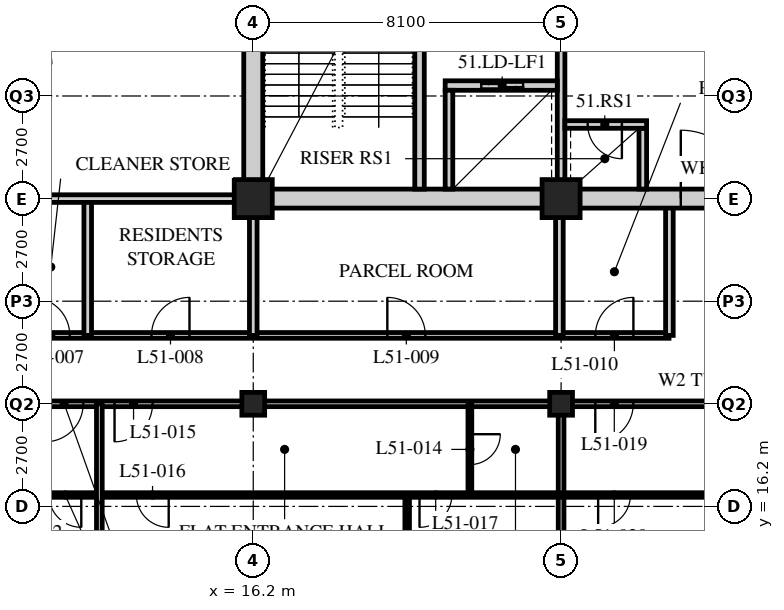
"""IFC4 building model, lengths in metres.
Left out: names, types, materials, properties, quantities, classifications, styles, units other than length and angle.
Written with IfcOpenShell. Run it as: python <this file> out.ifc"""

import sys

from ifc_helpers import new_model, si_unit, direction, frame, frame_2d, origin, origin_2d, place, context, subcontext, project, spatial, rectangle, hollow_rectangle, extrude, element, fill, save


model = new_model("IFC4")
c1 = context("Model", 3, precision=1e-05, world=origin(), true_north=direction((0.0, 1.0)))
c2 = subcontext(c1, "Body", "Model", "MODEL_VIEW")
j1 = project(units=[si_unit("LENGTHUNIT", "METRE"), si_unit("PLANEANGLEUNIT", "RADIAN")], contexts=[c1])
p1 = place(None, origin())
s1 = spatial("IfcSite", under=j1, at=p1, CompositionType="ELEMENT")
p2 = place(p1, origin())
s2 = spatial("IfcBuilding", under=s1, at=p2, CompositionType="ELEMENT")
p3 = place(p2, frame((0.0, 0.0, 199.2)))
s3 = spatial("IfcBuildingStorey", under=s2, at=p3, CompositionType="ELEMENT", Elevation=199.2)
p4 = place(p3, frame((16.2, 18.9, 0.0), z_axis=(0.0, 0.0, 1.0), x_axis=(1.0, 0.0, 0.0)))
e1 = element("IfcColumn", 1, at=p4, inside=s3, PredefinedType="COLUMN", context=c2, shape_type="SweptSolid", body=[
    extrude(hollow_rectangle(XDim=0.6, YDim=0.6, WallThickness=0.05, at=origin_2d()), origin(), (0.0, 0.0, 1.0), 3.6),
])
p5 = place(p3, frame((16.2, 24.3, 0.0), z_axis=(0.0, 0.0, 1.0), x_axis=(1.0, 0.0, 0.0)))
e2 = element("IfcColumn", 2, at=p5, inside=s3, PredefinedType="COLUMN", context=c2, shape_type="SweptSolid", body=[
    extrude(hollow_rectangle(XDim=1.0, YDim=1.0, WallThickness=0.1, at=origin_2d()), origin(), (0.0, 0.0, 1.0), 3.6),
])
p6 = place(p3, frame((24.3, 18.9, 0.0), z_axis=(0.0, 0.0, 1.0), x_axis=(1.0, 0.0, 0.0)))
e3 = element("IfcColumn", 3, at=p6, inside=s3, PredefinedType="COLUMN", context=c2, shape_type="SweptSolid", body=[
    extrude(hollow_rectangle(XDim=0.6, YDim=0.6, WallThickness=0.05, at=origin_2d()), origin(), (0.0, 0.0, 1.0), 3.6),
])
p7 = place(p3, frame((24.3, 24.3, 0.0), z_axis=(0.0, 0.0, 1.0), x_axis=(1.0, 0.0, 0.0)))
e4 = element("IfcColumn", 4, at=p7, inside=s3, PredefinedType="COLUMN", context=c2, shape_type="SweptSolid", body=[
    extrude(hollow_rectangle(XDim=1.0, YDim=1.0, WallThickness=0.1, at=origin_2d()), origin(), (0.0, 0.0, 1.0), 3.6),
])
p8 = place(p3, frame((8.1, 18.9, 0.0), z_axis=(0.0, 0.0, 1.0), x_axis=(1.0, 0.0, 0.0)))
e5 = element("IfcWall", 5, at=p8, inside=s3, PredefinedType="PARTITIONING", context=c2, shape_type="SweptSolid", body=[
    extrude(rectangle(XDim=40.5, YDim=0.15, at=frame_2d((20.25, 0.0))), origin(), (0.0, 0.0, 1.0), 2.778),
])
p9 = place(p8, frame((4.45, 0.0, 0.0)))
e6 = element("IfcOpeningElement", 6, at=p9, cuts=e5, PredefinedType="OPENING", context=c2, shape_type="SweptSolid", body=[
    extrude(rectangle(XDim=1.0, YDim=2.1, at=frame_2d((0.5, 1.05))), frame((0.0, 0.085, 0.0), z_axis=(0.0, -1.0, 0.0), x_axis=(1.0, 0.0, 0.0)), (0.0, 0.0, 1.0), 0.17),
])
p10 = place(p8, frame((17.1, 0.0, 0.0)))
e7 = element("IfcOpeningElement", 7, at=p10, cuts=e5, PredefinedType="OPENING", context=c2, shape_type="SweptSolid", body=[
    extrude(rectangle(XDim=1.0, YDim=2.1, at=frame_2d((0.5, 1.05))), frame((0.0, 0.085, 0.0), z_axis=(0.0, -1.0, 0.0), x_axis=(1.0, 0.0, 0.0)), (0.0, 0.0, 1.0), 0.17),
])
p11 = place(p8, frame((28.75, 0.0, 0.0)))
e8 = element("IfcOpeningElement", 8, at=p11, cuts=e5, PredefinedType="OPENING", context=c2, shape_type="SweptSolid", body=[
    extrude(rectangle(XDim=1.0, YDim=2.1, at=frame_2d((0.5, 1.05))), frame((0.0, 0.085, 0.0), z_axis=(0.0, -1.0, 0.0), x_axis=(1.0, 0.0, 0.0)), (0.0, 0.0, 1.0), 0.17),
])
p12 = place(p8, frame((2.625, 0.0, 0.0)))
e9 = element("IfcOpeningElement", 9, at=p12, cuts=e5, PredefinedType="OPENING", context=c2, shape_type="SweptSolid", body=[
    extrude(rectangle(XDim=1.0, YDim=2.1, at=frame_2d((0.5, 1.05))), frame((0.0, 0.085, 0.0), z_axis=(0.0, -1.0, 0.0), x_axis=(1.0, 0.0, 0.0)), (0.0, 0.0, 1.0), 0.17),
])
p13 = place(p8, frame((36.875, 0.0, 0.0)))
e10 = element("IfcOpeningElement", 10, at=p13, cuts=e5, PredefinedType="OPENING", context=c2, shape_type="SweptSolid", body=[
    extrude(rectangle(XDim=1.0, YDim=2.1, at=frame_2d((0.5, 1.05))), frame((0.0, 0.085, 0.0), z_axis=(0.0, -1.0, 0.0), x_axis=(1.0, 0.0, 0.0)), (0.0, 0.0, 1.0), 0.17),
])
p14 = place(p3, frame((9.9, 20.7, 0.0), z_axis=(0.0, 0.0, 1.0), x_axis=(1.0, 0.0, 0.0)))
e11 = element("IfcWall", 11, at=p14, inside=s3, PredefinedType="PARTITIONING", context=c2, shape_type="SweptSolid", body=[
    extrude(rectangle(XDim=17.24, YDim=0.15, at=frame_2d((8.62, 0.0))), origin(), (0.0, 0.0, 1.0), 3.39),
])
p15 = place(p14, frame((0.472, 0.0, 0.0)))
e12 = element("IfcOpeningElement", 12, at=p15, cuts=e11, PredefinedType="OPENING", context=c2, shape_type="SweptSolid", body=[
    extrude(rectangle(XDim=1.0, YDim=2.1, at=frame_2d((0.5, 1.05))), frame((0.0, 0.085, 0.0), z_axis=(0.0, -1.0, 0.0), x_axis=(1.0, 0.0, 0.0)), (0.0, 0.0, 1.0), 0.17),
])
p16 = place(p14, frame((3.622, 0.0, 0.0)))
e13 = element("IfcOpeningElement", 13, at=p16, cuts=e11, PredefinedType="OPENING", context=c2, shape_type="SweptSolid", body=[
    extrude(rectangle(XDim=1.0, YDim=2.1, at=frame_2d((0.5, 1.05))), frame((0.0, 0.085, 0.0), z_axis=(0.0, -1.0, 0.0), x_axis=(1.0, 0.0, 0.0)), (0.0, 0.0, 1.0), 0.17),
])
p17 = place(p14, frame((9.828, 0.0, 0.0)))
e14 = element("IfcOpeningElement", 14, at=p17, cuts=e11, PredefinedType="OPENING", context=c2, shape_type="SweptSolid", body=[
    extrude(rectangle(XDim=1.0, YDim=2.1, at=frame_2d((0.5, 1.05))), frame((0.0, 0.085, 0.0), z_axis=(0.0, -1.0, 0.0), x_axis=(1.0, 0.0, 0.0)), (0.0, 0.0, 1.0), 0.17),
])
p18 = place(p14, frame((15.303, 0.0, 0.0)))
e15 = element("IfcOpeningElement", 15, at=p18, cuts=e11, PredefinedType="OPENING", context=c2, shape_type="SweptSolid", body=[
    extrude(rectangle(XDim=1.0, YDim=2.1, at=frame_2d((0.5, 1.05))), frame((0.0, 0.085, 0.0), z_axis=(0.0, -1.0, 0.0), x_axis=(1.0, 0.0, 0.0)), (0.0, 0.0, 1.0), 0.17),
])
p19 = place(p3, frame((16.2, 20.7, 0.0), z_axis=(0.0, 0.0, 1.0), x_axis=(0.0, 1.0, 0.0)))
e16 = element("IfcWall", 16, at=p19, inside=s3, PredefinedType="SOLIDWALL", context=c2, shape_type="SweptSolid", body=[
    extrude(rectangle(XDim=3.6, YDim=0.2, at=frame_2d((1.8, 0.0))), origin(), (0.0, 0.0, 1.0), 2.778),
])
p20 = place(p3, frame((11.844, 20.7, 0.0), z_axis=(0.0, 0.0, 1.0), x_axis=(0.0, 1.0, 0.0)))
e17 = element("IfcWall", 17, at=p20, inside=s3, PredefinedType="SOLIDWALL", context=c2, shape_type="SweptSolid", body=[
    extrude(rectangle(XDim=3.6, YDim=0.2, at=frame_2d((1.8, 0.0))), origin(), (0.0, 0.0, 1.0), 3.39),
])
p21 = place(p3, frame((24.256, 20.7, 0.0), z_axis=(0.0, 0.0, 1.0), x_axis=(0.0, 1.0, 0.0)))
e18 = element("IfcWall", 18, at=p21, inside=s3, PredefinedType="SOLIDWALL", context=c2, shape_type="SweptSolid", body=[
    extrude(rectangle(XDim=3.6, YDim=0.2, at=frame_2d((1.8, 0.0))), origin(), (0.0, 0.0, 1.0), 2.778),
])
p22 = place(p3, frame((27.15, 20.7, 0.0), z_axis=(0.0, 0.0, 1.0), x_axis=(0.0, 1.0, 0.0)))
e19 = element("IfcWall", 19, at=p22, inside=s3, PredefinedType="SOLIDWALL", context=c2, shape_type="SweptSolid", body=[
    extrude(rectangle(XDim=3.6, YDim=0.2, at=frame_2d((1.8, 0.0))), origin(), (0.0, 0.0, 1.0), 3.39),
])
p23 = place(p3, frame((9.9, 24.3, 0.0), z_axis=(0.0, 0.0, 1.0), x_axis=(1.0, 0.0, 0.0)))
e20 = element("IfcWall", 20, at=p23, inside=s3, PredefinedType="SOLIDWALL", context=c2, shape_type="SweptSolid", body=[
    extrude(rectangle(XDim=6.3, YDim=0.2, at=frame_2d((3.15, 0.0))), origin(), (0.0, 0.0, 1.0), 3.39),
])
p24 = place(p3, frame((21.9, 18.9, 0.0), z_axis=(0.0, 0.0, 1.0), x_axis=(0.0, -1.0, 0.0)))
e21 = element("IfcWall", 21, at=p24, inside=s3, PredefinedType="PARTITIONING", context=c2, shape_type="SweptSolid", body=[
    extrude(rectangle(XDim=2.4, YDim=0.1, at=frame_2d((1.2, 0.0))), origin(), (0.0, 0.0, 1.0), 3.39),
])
p25 = place(p24, frame((0.8, 0.0, 0.0)))
e22 = element("IfcOpeningElement", 22, at=p25, cuts=e21, PredefinedType="OPENING", context=c2, shape_type="SweptSolid", body=[
    extrude(rectangle(XDim=0.8, YDim=2.1, at=frame_2d((0.4, 1.05))), frame((0.0, 0.06, 0.0), z_axis=(0.0, -1.0, 0.0), x_axis=(1.0, 0.0, 0.0)), (0.0, 0.0, 1.0), 0.12),
])
p26 = place(p3, frame((20.25, 16.5, 0.0), z_axis=(0.0, 0.0, 1.0), x_axis=(0.0, -1.0, 0.0)))
e23 = element("IfcWall", 23, at=p26, inside=s3, PredefinedType="PARTITIONING", context=c2, shape_type="SweptSolid", body=[
    extrude(rectangle(XDim=5.4, YDim=0.12, at=frame_2d((2.7, 0.0))), origin(), (0.0, 0.0, 1.0), 3.39),
])
p27 = place(p3, frame((24.3, 18.9, 0.0), z_axis=(0.0, 0.0, 1.0), x_axis=(0.0, -1.0, 0.0)))
e24 = element("IfcWall", 24, at=p27, inside=s3, PredefinedType="PARTITIONING", context=c2, shape_type="SweptSolid", body=[
    extrude(rectangle(XDim=7.8, YDim=0.15, at=frame_2d((3.9, 0.0))), origin(), (0.0, 0.0, 1.0), 2.778),
])
p28 = place(p3, frame((8.1, 16.5, 0.0), z_axis=(0.0, 0.0, 1.0), x_axis=(1.0, 0.0, 0.0)))
e25 = element("IfcWall", 25, at=p28, inside=s3, PredefinedType="PARTITIONING", context=c2, shape_type="SweptSolid", body=[
    extrude(rectangle(XDim=40.5, YDim=0.12, at=frame_2d((20.25, 0.0))), origin(), (0.0, 0.0, 1.0), 3.39),
])
p29 = place(p28, frame((5.025, 0.0, 0.0)))
e26 = element("IfcOpeningElement", 26, at=p29, cuts=e25, PredefinedType="OPENING", context=c2, shape_type="SweptSolid", body=[
    extrude(rectangle(XDim=0.85, YDim=2.1, at=frame_2d((0.425, 1.05))), frame((0.0, 0.07, 0.0), z_axis=(0.0, -1.0, 0.0), x_axis=(1.0, 0.0, 0.0)), (0.0, 0.0, 1.0), 0.14),
])
p30 = place(p28, frame((12.475, 0.0, 0.0)))
e27 = element("IfcOpeningElement", 27, at=p30, cuts=e25, PredefinedType="OPENING", context=c2, shape_type="SweptSolid", body=[
    extrude(rectangle(XDim=0.85, YDim=2.1, at=frame_2d((0.425, 1.05))), frame((0.0, 0.07, 0.0), z_axis=(0.0, -1.0, 0.0), x_axis=(1.0, 0.0, 0.0)), (0.0, 0.0, 1.0), 0.14),
])
p31 = place(p28, frame((17.175, 0.0, 0.0)))
e28 = element("IfcOpeningElement", 28, at=p31, cuts=e25, PredefinedType="OPENING", context=c2, shape_type="SweptSolid", body=[
    extrude(rectangle(XDim=0.85, YDim=2.1, at=frame_2d((0.425, 1.05))), frame((0.0, 0.07, 0.0), z_axis=(0.0, -1.0, 0.0), x_axis=(1.0, 0.0, 0.0)), (0.0, 0.0, 1.0), 0.14),
])
p32 = place(p28, frame((24.625, 0.0, 0.0)))
e29 = element("IfcOpeningElement", 29, at=p32, cuts=e25, PredefinedType="OPENING", context=c2, shape_type="SweptSolid", body=[
    extrude(rectangle(XDim=0.85, YDim=2.1, at=frame_2d((0.425, 1.05))), frame((0.0, 0.07, 0.0), z_axis=(0.0, -1.0, 0.0), x_axis=(1.0, 0.0, 0.0)), (0.0, 0.0, 1.0), 0.14),
])
p33 = place(p28, frame((29.325, 0.0, 0.0)))
e30 = element("IfcOpeningElement", 30, at=p33, cuts=e25, PredefinedType="OPENING", context=c2, shape_type="SweptSolid", body=[
    extrude(rectangle(XDim=0.85, YDim=2.1, at=frame_2d((0.425, 1.05))), frame((0.0, 0.07, 0.0), z_axis=(0.0, -1.0, 0.0), x_axis=(1.0, 0.0, 0.0)), (0.0, 0.0, 1.0), 0.14),
])
p34 = place(p28, frame((32.725, 0.0, 0.0)))
e31 = element("IfcOpeningElement", 31, at=p34, cuts=e25, PredefinedType="OPENING", context=c2, shape_type="SweptSolid", body=[
    extrude(rectangle(XDim=0.85, YDim=2.1, at=frame_2d((0.425, 1.05))), frame((0.0, 0.07, 0.0), z_axis=(0.0, -1.0, 0.0), x_axis=(1.0, 0.0, 0.0)), (0.0, 0.0, 1.0), 0.14),
])
p35 = place(p28, frame((2.725, 0.0, 0.0)))
e32 = element("IfcOpeningElement", 32, at=p35, cuts=e25, PredefinedType="OPENING", context=c2, shape_type="SweptSolid", body=[
    extrude(rectangle(XDim=0.85, YDim=2.1, at=frame_2d((0.425, 1.05))), frame((0.0, 0.07, 0.0), z_axis=(0.0, -1.0, 0.0), x_axis=(1.0, 0.0, 0.0)), (0.0, 0.0, 1.0), 0.14),
])
p36 = place(p28, frame((36.925, 0.0, 0.0)))
e33 = element("IfcOpeningElement", 33, at=p36, cuts=e25, PredefinedType="OPENING", context=c2, shape_type="SweptSolid", body=[
    extrude(rectangle(XDim=0.85, YDim=2.1, at=frame_2d((0.425, 1.05))), frame((0.0, 0.07, 0.0), z_axis=(0.0, -1.0, 0.0), x_axis=(1.0, 0.0, 0.0)), (0.0, 0.0, 1.0), 0.14),
])
p37 = place(p3, frame((12.15, 18.9, 0.0), z_axis=(0.0, 0.0, 1.0), x_axis=(0.0, -1.0, 0.0)))
e34 = element("IfcWall", 34, at=p37, inside=s3, PredefinedType="PARTITIONING", context=c2, shape_type="SweptSolid", body=[
    extrude(rectangle(XDim=7.8, YDim=0.15, at=frame_2d((3.9, 0.0))), origin(), (0.0, 0.0, 1.0), 3.39),
])
p38 = place(p3, frame((15.95, 24.3, 0.0), z_axis=(0.0, 0.0, 1.0), x_axis=(1.0, 0.0, 0.0)))
e35 = element("IfcWall", 35, at=p38, inside=s3, PredefinedType="SOLIDWALL", context=c2, shape_type="SweptSolid", body=[
    extrude(rectangle(XDim=24.8, YDim=0.5, at=frame_2d((12.4, 0.0))), origin(), (0.0, 0.0, 1.0), 2.74),
])
p39 = place(p38, frame((11.5, 0.0, 0.0)))
e36 = element("IfcOpeningElement", 36, at=p39, cuts=e35, PredefinedType="OPENING", context=c2, shape_type="SweptSolid", body=[
    extrude(rectangle(XDim=1.8, YDim=2.4, at=frame_2d((0.9, 1.2))), frame((0.0, 0.26, 0.0), z_axis=(0.0, -1.0, 0.0), x_axis=(1.0, 0.0, 0.0)), (0.0, 0.0, 1.0), 0.52),
])
p40 = place(p3, frame((16.2, 24.55, 0.0), z_axis=(0.0, 0.0, 1.0), x_axis=(0.0, 1.0, 0.0)))
e37 = element("IfcWall", 37, at=p40, inside=s3, PredefinedType="SOLIDWALL", context=c2, shape_type="SweptSolid", body=[
    extrude(rectangle(XDim=15.7, YDim=0.5, at=frame_2d((7.85, 0.0))), origin(), (0.0, 0.0, 1.0), 2.778),
])
p41 = place(p3, frame((24.3, 24.55, 0.0), z_axis=(0.0, 0.0, 1.0), x_axis=(0.0, 1.0, 0.0)))
e38 = element("IfcWall", 38, at=p41, inside=s3, PredefinedType="SOLIDWALL", context=c2, shape_type="SweptSolid", body=[
    extrude(rectangle(XDim=7.75, YDim=0.2, at=frame_2d((3.875, 0.0))), origin(), (0.0, 0.0, 1.0), 2.778),
])
p42 = place(p41, frame((4.6, 0.0, 0.0)))
e39 = element("IfcOpeningElement", 39, at=p42, cuts=e38, PredefinedType="OPENING", context=c2, shape_type="SweptSolid", body=[
    extrude(rectangle(XDim=1.2, YDim=2.1, at=frame_2d((0.6, 1.05))), frame((0.0, 0.11, 0.0), z_axis=(0.0, -1.0, 0.0), x_axis=(1.0, 0.0, 0.0)), (0.0, 0.0, 1.0), 0.22),
])
p43 = place(p3, frame((20.575, 24.55, 0.0), z_axis=(0.0, 0.0, 1.0), x_axis=(0.0, 1.0, 0.0)))
e40 = element("IfcWall", 40, at=p43, inside=s3, PredefinedType="SOLIDWALL", context=c2, shape_type="SweptSolid", body=[
    extrude(rectangle(XDim=7.75, YDim=0.25, at=frame_2d((3.875, 0.0))), origin(), (0.0, 0.0, 1.0), 3.39),
])
p44 = place(p43, frame((6.2, 0.0, 0.0)))
e41 = element("IfcOpeningElement", 41, at=p44, cuts=e40, PredefinedType="OPENING", context=c2, shape_type="SweptSolid", body=[
    extrude(rectangle(XDim=1.2, YDim=2.1, at=frame_2d((0.6, 1.05))), frame((0.0, 0.135, 0.0), z_axis=(0.0, -1.0, 0.0), x_axis=(1.0, 0.0, 0.0)), (0.0, 0.0, 1.0), 0.27),
])
p45 = place(p3, frame((21.25, 27.275, 0.0), z_axis=(0.0, 0.0, 1.0), x_axis=(1.0, 0.0, 0.0)))
e42 = element("IfcWall", 42, at=p45, inside=s3, PredefinedType="SOLIDWALL", context=c2, shape_type="SweptSolid", body=[
    extrude(rectangle(XDim=2.95, YDim=0.25, at=frame_2d((1.475, 0.0))), origin(), (0.0, 0.0, 1.0), 3.39),
])
p46 = place(p45, frame((0.95, 0.0, 0.0)))
e43 = element("IfcOpeningElement", 43, at=p46, cuts=e42, PredefinedType="OPENING", context=c2, shape_type="SweptSolid", body=[
    extrude(rectangle(XDim=1.1, YDim=2.4, at=frame_2d((0.55, 1.2))), frame((0.0, 0.135, 0.0), z_axis=(0.0, -1.0, 0.0), x_axis=(1.0, 0.0, 0.0)), (0.0, 0.0, 1.0), 0.27),
])
p47 = place(p3, frame((21.35, 24.55, 0.0), z_axis=(0.0, 0.0, 1.0), x_axis=(0.0, 1.0, 0.0)))
e44 = element("IfcWall", 44, at=p47, inside=s3, PredefinedType="SOLIDWALL", context=c2, shape_type="SweptSolid", body=[
    extrude(rectangle(XDim=2.6, YDim=0.2, at=frame_2d((1.3, 0.0))), origin(), (0.0, 0.0, 1.0), 3.39),
])
p48 = place(p3, frame((26.45, 24.55, 0.0), z_axis=(0.0, 0.0, 1.0), x_axis=(0.0, 1.0, 0.0)))
e45 = element("IfcWall", 45, at=p48, inside=s3, PredefinedType="SOLIDWALL", context=c2, shape_type="SweptSolid", body=[
    extrude(rectangle(XDim=1.6, YDim=0.2, at=frame_2d((0.8, 0.0))), origin(), (0.0, 0.0, 1.0), 3.39),
])
p49 = place(p3, frame((24.4, 26.25, 0.0), z_axis=(0.0, 0.0, 1.0), x_axis=(1.0, 0.0, 0.0)))
e46 = element("IfcWall", 46, at=p49, inside=s3, PredefinedType="SOLIDWALL", context=c2, shape_type="SweptSolid", body=[
    extrude(rectangle(XDim=2.15, YDim=0.2, at=frame_2d((1.075, 0.0))), origin(), (0.0, 0.0, 1.0), 3.39),
])
p50 = place(p49, frame((0.6, 0.0, 0.0)))
e47 = element("IfcOpeningElement", 47, at=p50, cuts=e46, PredefinedType="OPENING", context=c2, shape_type="SweptSolid", body=[
    extrude(rectangle(XDim=0.9, YDim=2.1, at=frame_2d((0.45, 1.05))), frame((0.0, 0.11, 0.0), z_axis=(0.0, -1.0, 0.0), x_axis=(1.0, 0.0, 0.0)), (0.0, 0.0, 1.0), 0.22),
])
p51 = place(p15, origin())
e48 = element("IfcDoor", 48, at=p51, inside=s3, OperationType="SINGLE_SWING_LEFT", PredefinedType="DOOR", context=c2, shape_type="SweptSolid", body=[
    extrude(rectangle(XDim=1.0, YDim=2.1, at=frame_2d((0.5, 1.05))), frame((0.0, 0.025, 0.0), z_axis=(0.0, -1.0, 0.0), x_axis=(1.0, 0.0, 0.0)), (0.0, 0.0, 1.0), 0.05),
])
fill(e12, e48)
p52 = place(p16, origin())
e49 = element("IfcDoor", 49, at=p52, inside=s3, OperationType="SINGLE_SWING_RIGHT", PredefinedType="DOOR", context=c2, shape_type="SweptSolid", body=[
    extrude(rectangle(XDim=1.0, YDim=2.1, at=frame_2d((0.5, 1.05))), frame((0.0, 0.025, 0.0), z_axis=(0.0, -1.0, 0.0), x_axis=(1.0, 0.0, 0.0)), (0.0, 0.0, 1.0), 0.05),
])
fill(e13, e49)
p53 = place(p17, origin())
e50 = element("IfcDoor", 50, at=p53, inside=s3, OperationType="SINGLE_SWING_LEFT", PredefinedType="DOOR", context=c2, shape_type="SweptSolid", body=[
    extrude(rectangle(XDim=1.0, YDim=2.1, at=frame_2d((0.5, 1.05))), frame((0.0, 0.025, 0.0), z_axis=(0.0, -1.0, 0.0), x_axis=(1.0, 0.0, 0.0)), (0.0, 0.0, 1.0), 0.05),
])
fill(e14, e50)
p54 = place(p18, origin())
e51 = element("IfcDoor", 51, at=p54, inside=s3, OperationType="SINGLE_SWING_RIGHT", PredefinedType="DOOR", context=c2, shape_type="SweptSolid", body=[
    extrude(rectangle(XDim=1.0, YDim=2.1, at=frame_2d((0.5, 1.05))), frame((0.0, 0.025, 0.0), z_axis=(0.0, -1.0, 0.0), x_axis=(1.0, 0.0, 0.0)), (0.0, 0.0, 1.0), 0.05),
])
fill(e15, e51)
p55 = place(p25, origin())
e52 = element("IfcDoor", 52, at=p55, inside=s3, OperationType="SINGLE_SWING_LEFT", PredefinedType="DOOR", context=c2, shape_type="SweptSolid", body=[
    extrude(rectangle(XDim=0.8, YDim=2.1, at=frame_2d((0.4, 1.05))), frame((0.0, 0.025, 0.0), z_axis=(0.0, -1.0, 0.0), x_axis=(1.0, 0.0, 0.0)), (0.0, 0.0, 1.0), 0.05),
])
fill(e22, e52)
p56 = place(p9, origin())
e53 = element("IfcDoor", 53, at=p56, inside=s3, OperationType="SINGLE_SWING_RIGHT", PredefinedType="DOOR", context=c2, shape_type="SweptSolid", body=[
    extrude(rectangle(XDim=1.0, YDim=2.1, at=frame_2d((0.5, 1.05))), frame((0.0, 0.025, 0.0), z_axis=(0.0, -1.0, 0.0), x_axis=(1.0, 0.0, 0.0)), (0.0, 0.0, 1.0), 0.05),
])
fill(e6, e53)
p57 = place(p29, origin())
e54 = element("IfcDoor", 54, at=p57, inside=s3, OperationType="SINGLE_SWING_LEFT", PredefinedType="DOOR", context=c2, shape_type="SweptSolid", body=[
    extrude(rectangle(XDim=0.85, YDim=2.1, at=frame_2d((0.425, 1.05))), frame((0.0, 0.025, 0.0), z_axis=(0.0, -1.0, 0.0), x_axis=(1.0, 0.0, 0.0)), (0.0, 0.0, 1.0), 0.05),
])
fill(e26, e54)
p58 = place(p30, origin())
e55 = element("IfcDoor", 55, at=p58, inside=s3, OperationType="SINGLE_SWING_RIGHT", PredefinedType="DOOR", context=c2, shape_type="SweptSolid", body=[
    extrude(rectangle(XDim=0.85, YDim=2.1, at=frame_2d((0.425, 1.05))), frame((0.0, 0.025, 0.0), z_axis=(0.0, -1.0, 0.0), x_axis=(1.0, 0.0, 0.0)), (0.0, 0.0, 1.0), 0.05),
])
fill(e27, e55)
p59 = place(p10, origin())
e56 = element("IfcDoor", 56, at=p59, inside=s3, OperationType="SINGLE_SWING_RIGHT", PredefinedType="DOOR", context=c2, shape_type="SweptSolid", body=[
    extrude(rectangle(XDim=1.0, YDim=2.1, at=frame_2d((0.5, 1.05))), frame((0.0, 0.025, 0.0), z_axis=(0.0, -1.0, 0.0), x_axis=(1.0, 0.0, 0.0)), (0.0, 0.0, 1.0), 0.05),
])
fill(e7, e56)
p60 = place(p31, origin())
e57 = element("IfcDoor", 57, at=p60, inside=s3, OperationType="SINGLE_SWING_RIGHT", PredefinedType="DOOR", context=c2, shape_type="SweptSolid", body=[
    extrude(rectangle(XDim=0.85, YDim=2.1, at=frame_2d((0.425, 1.05))), frame((0.0, 0.025, 0.0), z_axis=(0.0, -1.0, 0.0), x_axis=(1.0, 0.0, 0.0)), (0.0, 0.0, 1.0), 0.05),
])
fill(e28, e57)
p61 = place(p12, origin())
e58 = element("IfcDoor", 58, at=p61, inside=s3, OperationType="SINGLE_SWING_RIGHT", PredefinedType="DOOR", context=c2, shape_type="SweptSolid", body=[
    extrude(rectangle(XDim=1.0, YDim=2.1, at=frame_2d((0.5, 1.05))), frame((0.0, 0.025, 0.0), z_axis=(0.0, -1.0, 0.0), x_axis=(1.0, 0.0, 0.0)), (0.0, 0.0, 1.0), 0.05),
])
fill(e9, e58)
p62 = place(p35, origin())
e59 = element("IfcDoor", 59, at=p62, inside=s3, OperationType="SINGLE_SWING_LEFT", PredefinedType="DOOR", context=c2, shape_type="SweptSolid", body=[
    extrude(rectangle(XDim=0.85, YDim=2.1, at=frame_2d((0.425, 1.05))), frame((0.0, 0.025, 0.0), z_axis=(0.0, -1.0, 0.0), x_axis=(1.0, 0.0, 0.0)), (0.0, 0.0, 1.0), 0.05),
])
fill(e32, e59)
p63 = place(p50, origin())
e60 = element("IfcDoor", 60, at=p63, inside=s3, OperationType="SINGLE_SWING_LEFT", PredefinedType="DOOR", context=c2, shape_type="SweptSolid", body=[
    extrude(rectangle(XDim=0.9, YDim=2.1, at=frame_2d((0.45, 1.05))), frame((0.0, 0.025, 0.0), z_axis=(0.0, -1.0, 0.0), x_axis=(1.0, 0.0, 0.0)), (0.0, 0.0, 1.0), 0.05),
])
fill(e47, e60)
p64 = place(p46, origin())
e61 = element("IfcDoor", 61, at=p64, inside=s3, OperationType="DOUBLE_DOOR_SLIDING", PredefinedType="DOOR", context=c2, shape_type="SweptSolid", body=[
    extrude(rectangle(XDim=1.1, YDim=2.4, at=frame_2d((0.55, 1.2))), frame((0.0, 0.025, 0.0), z_axis=(0.0, -1.0, 0.0), x_axis=(1.0, 0.0, 0.0)), (0.0, 0.0, 1.0), 0.05),
])
fill(e43, e61)
p65 = place(p39, origin())
e62 = element("IfcDoor", 62, at=p65, inside=s3, OperationType="DOUBLE_DOOR_SINGLE_SWING", PredefinedType="DOOR", context=c2, shape_type="SweptSolid", body=[
    extrude(rectangle(XDim=1.8, YDim=2.4, at=frame_2d((0.9, 1.2))), frame((0.0, 0.025, 0.0), z_axis=(0.0, -1.0, 0.0), x_axis=(1.0, 0.0, 0.0)), (0.0, 0.0, 1.0), 0.05),
])
fill(e36, e62)
save(model, sys.argv[1])
